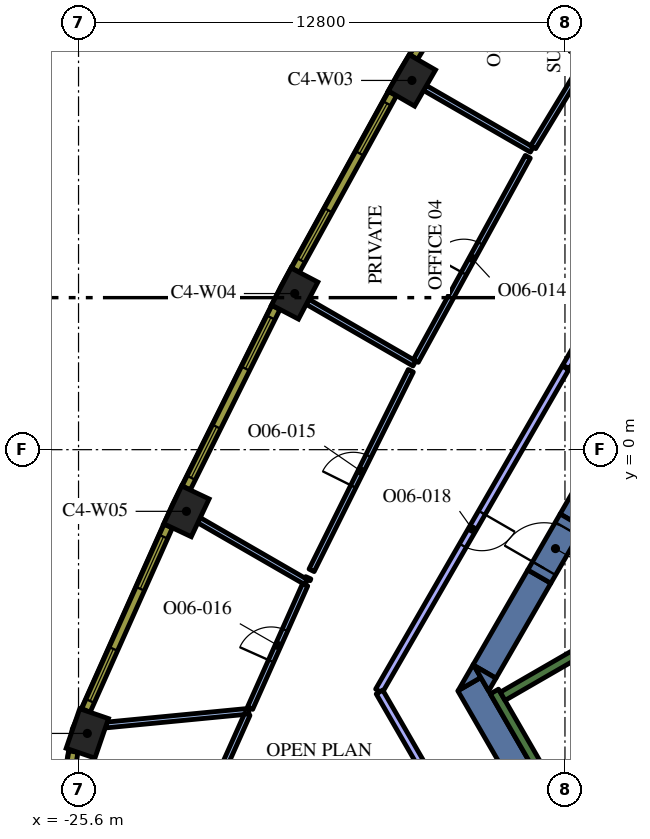
"""IFC4 building model, lengths in metres.
Left out: names, types, materials, properties, quantities, classifications, styles, units other than length and angle.
Written with IfcOpenShell. Run it as: python <this file> out.ifc"""

import sys

from ifc_helpers import new_model, si_unit, direction, frame, frame_2d, origin, origin_2d, place, context, subcontext, project, spatial, polyline, rectangle, outline, extrude, element, fill, save


model = new_model("IFC4")
c1 = context("Model", 3, precision=1e-05, world=origin(), true_north=direction((0.0, 1.0)))
c2 = subcontext(c1, "Body", "Model", "MODEL_VIEW")
j1 = project(units=[si_unit("LENGTHUNIT", "METRE"), si_unit("PLANEANGLEUNIT", "RADIAN")], contexts=[c1])
p1 = place(None, origin())
s1 = spatial("IfcSite", under=j1, at=p1, CompositionType="ELEMENT")
p2 = place(p1, origin())
s2 = spatial("IfcBuilding", under=s1, at=p2, CompositionType="ELEMENT")
p3 = place(p2, frame((0.0, 0.0, 201.6)))
s3 = spatial("IfcBuildingStorey", under=s2, at=p3, CompositionType="ELEMENT", Elevation=201.6)
for number, where, z_axis, x_axis in (
    (1, (-16.827, 9.715, 0.0), (0.0, 0.0, 1.0), (-0.5, -0.866, 0.0)),
    (2, (-19.912, 4.108, 0.0), (0.0, 0.0, 1.0), (-0.464, -0.886, 0.0)),
    (3, (-22.76, -1.623, 0.0), (0.0, 0.0, 1.0), (-0.426, -0.905, 0.0)),
    (4, (-25.369, -7.466, 0.0), (0.0, 0.0, 1.0), (-0.324, -0.946, 0.0)),
):
    element("IfcColumn", number, at=place(p3, frame(where, z_axis=z_axis, x_axis=x_axis)), inside=s3, PredefinedType="COLUMN", context=c2, shape_type="SweptSolid", body=[
        extrude(rectangle(XDim=1.1, YDim=0.8, at=origin_2d()), origin(), (0.0, 0.0, 1.0), 4.2),
    ])
p4 = place(p3, frame((-13.402, -9.487, 0.0), z_axis=(0.0, 0.0, 1.0), x_axis=(-0.500020498207, 0.866013568815, 0.0)))
e5 = element("IfcWall", 5, at=p4, inside=s3, PredefinedType="SOLIDWALL", context=c2, shape_type="SweptSolid", body=[
    extrude(rectangle(XDim=3.829, YDim=0.7, at=frame_2d((1.915, 0.0))), origin(), (0.0, 0.0, 1.0), 4.2),
])
p5 = place(p3, origin())
e6 = element("IfcWall", 6, at=p5, inside=s3, PredefinedType="SOLIDWALL", context=c2, shape_type="SweptSolid", body=[
    extrude(outline(polyline([(-15.014, -5.995), (-15.611, -6.339), (-15.213, -5.65), (-15.014, -5.995)])), origin(), (0.0, 0.0, 1.0), 4.2),
])
p6 = place(p3, frame((-13.475, -3.339, 0.0), z_axis=(0.0, 0.0, 1.0), x_axis=(-0.500008214683, -0.866020660983, 0.0)))
e7 = element("IfcWall", 7, at=p6, inside=s3, PredefinedType="SOLIDWALL", context=c2, shape_type="SweptSolid", body=[
    extrude(rectangle(XDim=2.884, YDim=0.7, at=frame_2d((1.442, 0.0))), origin(), (0.0, 0.0, 1.0), 4.2),
])
e8 = element("IfcWall", 8, at=p5, inside=s3, PredefinedType="SOLIDWALL", context=c2, shape_type="SweptSolid", body=[
    extrude(outline(polyline([(-14.809, -6.35), (-15.197, -5.678), (-14.615, -6.014), (-14.809, -6.35)])), origin(), (0.0, 0.0, 1.0), 4.2),
])
p7 = place(p3, frame((-12.625, -1.867, 0.0), z_axis=(0.0, 0.0, 1.0), x_axis=(0.499998841866, 0.866026072432, 0.0)))
e9 = element("IfcWall", 9, at=p7, inside=s3, PredefinedType="SOLIDWALL", context=c2, shape_type="SweptSolid", body=[
    extrude(rectangle(XDim=16.694, YDim=0.7, at=frame_2d((8.347, 0.0))), origin(), (0.0, 0.0, 1.0), 4.2),
])
p8 = place(p3, frame((-12.84, -9.511, 0.0), z_axis=(0.0, 0.0, 1.0), x_axis=(-0.499997733992, 0.866026712061, 0.0)))
e10 = element("IfcWall", 10, at=p8, inside=s3, PredefinedType="SOLIDWALL", context=c2, shape_type="SweptSolid", body=[
    extrude(rectangle(XDim=3.634, YDim=0.25, at=frame_2d((1.817, 0.0))), origin(), (0.0, 0.0, 1.0), 4.2),
])
p9 = place(p3, frame((-14.44, -6.49, 0.0), z_axis=(0.0, 0.0, 1.0), x_axis=(0.866022966069, 0.500004222222, 0.0)))
e11 = element("IfcWall", 11, at=p9, inside=s3, PredefinedType="SOLIDWALL", context=c2, shape_type="SweptSolid", body=[
    extrude(rectangle(XDim=6.8, YDim=0.25, at=frame_2d((3.4, 0.0))), origin(), (0.0, 0.0, 1.0), 4.2),
])
p10 = place(p3, frame((-12.84, -9.261, 0.0), z_axis=(0.0, 0.0, 1.0), x_axis=(0.866016039709, 0.500016218704, 0.0)))
e12 = element("IfcWall", 12, at=p10, inside=s3, PredefinedType="SOLIDWALL", context=c2, shape_type="SweptSolid", body=[
    extrude(rectangle(XDim=7.05, YDim=0.25, at=frame_2d((3.525, 0.0))), origin(), (0.0, 0.0, 1.0), 4.2),
])
p11 = place(p3, frame((-13.475, -3.339, 0.0), z_axis=(0.0, 0.0, 1.0), x_axis=(0.499954529098, 0.86605165483, 0.0)))
e13 = element("IfcWall", 13, at=p11, inside=s3, PredefinedType="SOLIDWALL", context=c2, shape_type="SweptSolid", body=[
    extrude(rectangle(XDim=1.7, YDim=0.7, at=frame_2d((0.85, 0.0))), origin(), (0.0, 0.0, 1.0), 4.2),
])
p12 = place(p11, frame((0.25, 0.0, 0.0)))
e14 = element("IfcOpeningElement", 14, at=p12, cuts=e13, PredefinedType="OPENING", context=c2, shape_type="SweptSolid", body=[
    extrude(rectangle(XDim=1.2, YDim=2.1, at=frame_2d((0.6, 1.05))), frame((0.0, 0.36, 0.0), z_axis=(0.0, -1.0, 0.0), x_axis=(1.0, 0.0, 0.0)), (0.0, 0.0, 1.0), 0.72),
])
p13 = place(p3, frame((-13.674, 7.895, 0.0), z_axis=(0.0, 0.0, 1.0), x_axis=(-0.866032537582, 0.499987643696, 0.0)))
e15 = element("IfcWall", 15, at=p13, inside=s3, PredefinedType="PARTITIONING", context=c2, shape_type="SweptSolid", body=[
    extrude(rectangle(XDim=3.241, YDim=0.15, at=frame_2d((1.62, 0.0))), origin(), (0.0, 0.0, 1.0), 3.45),
])
p14 = place(p3, frame((-13.635, 7.959, 0.0), z_axis=(0.0, 0.0, 1.0), x_axis=(0.518788941184, 0.854902353784, 0.0)))
e16 = element("IfcWall", 16, at=p14, inside=s3, PredefinedType="PARTITIONING", context=c2, shape_type="SweptSolid", body=[
    extrude(rectangle(XDim=6.129, YDim=0.15, at=frame_2d((3.064, 0.0))), origin(), (0.0, 0.0, 1.0), 3.45),
])
p15 = place(p14, frame((2.629, 0.0, 0.0)))
e17 = element("IfcOpeningElement", 17, at=p15, cuts=e16, PredefinedType="OPENING", context=c2, shape_type="SweptSolid", body=[
    extrude(rectangle(XDim=0.9, YDim=2.1, at=frame_2d((0.45, 1.05))), frame((0.0, 0.085, 0.0), z_axis=(0.0, -1.0, 0.0), x_axis=(1.0, 0.0, 0.0)), (0.0, 0.0, 1.0), 0.17),
])
p16 = place(p3, frame((-16.761, 2.268, 0.0), z_axis=(0.0, 0.0, 1.0), x_axis=(-0.866022812202, 0.500004488726, 0.0)))
e18 = element("IfcWall", 18, at=p16, inside=s3, PredefinedType="PARTITIONING", context=c2, shape_type="SweptSolid", body=[
    extrude(rectangle(XDim=3.247, YDim=0.15, at=frame_2d((1.624, 0.0))), origin(), (0.0, 0.0, 1.0), 3.45),
])
p17 = place(p3, frame((-16.725, 2.333, 0.0), z_axis=(0.0, 0.0, 1.0), x_axis=(0.480955103875, 0.876745224142, 0.0)))
e19 = element("IfcWall", 19, at=p17, inside=s3, PredefinedType="PARTITIONING", context=c2, shape_type="SweptSolid", body=[
    extrude(rectangle(XDim=6.129, YDim=0.15, at=frame_2d((3.064, 0.0))), origin(), (0.0, 0.0, 1.0), 3.45),
])
p18 = place(p17, frame((2.629, 0.0, 0.0)))
e20 = element("IfcOpeningElement", 20, at=p18, cuts=e19, PredefinedType="OPENING", context=c2, shape_type="SweptSolid", body=[
    extrude(rectangle(XDim=0.9, YDim=2.1, at=frame_2d((0.45, 1.05))), frame((0.0, 0.085, 0.0), z_axis=(0.0, -1.0, 0.0), x_axis=(1.0, 0.0, 0.0)), (0.0, 0.0, 1.0), 0.17),
])
p19 = place(p3, frame((-19.606, -3.487, 0.0), z_axis=(0.0, 0.0, 1.0), x_axis=(-0.866017179828, 0.50001424404, 0.0)))
e21 = element("IfcWall", 21, at=p19, inside=s3, PredefinedType="PARTITIONING", context=c2, shape_type="SweptSolid", body=[
    extrude(rectangle(XDim=3.259, YDim=0.15, at=frame_2d((1.63, 0.0))), origin(), (0.0, 0.0, 1.0), 3.45),
])
p20 = place(p3, frame((-19.467, -3.175, 0.0), z_axis=(0.0, 0.0, 1.0), x_axis=(0.445180755526, 0.895440726631, 0.0)))
e22 = element("IfcWall", 22, at=p20, inside=s3, PredefinedType="PARTITIONING", context=c2, shape_type="SweptSolid", body=[
    extrude(rectangle(XDim=5.864, YDim=0.15, at=frame_2d((2.932, 0.0))), origin(), (0.0, 0.0, 1.0), 3.45),
])
p21 = place(p20, frame((2.464, 0.0, 0.0)))
e23 = element("IfcOpeningElement", 23, at=p21, cuts=e22, PredefinedType="OPENING", context=c2, shape_type="SweptSolid", body=[
    extrude(rectangle(XDim=0.9, YDim=2.1, at=frame_2d((0.45, 1.05))), frame((0.0, 0.085, 0.0), z_axis=(0.0, -1.0, 0.0), x_axis=(1.0, 0.0, 0.0)), (0.0, 0.0, 1.0), 0.17),
])
p22 = place(p3, frame((-19.554, -3.371, 0.0), z_axis=(0.0, 0.0, 1.0), x_axis=(-0.408782924594, -0.912631645605, 0.0)))
e24 = element("IfcWall", 24, at=p22, inside=s3, PredefinedType="PARTITIONING", context=c2, shape_type="SweptSolid", body=[
    extrude(rectangle(XDim=0.051, YDim=0.15, at=frame_2d((0.026, 0.0))), origin(), (0.0, 0.0, 1.0), 3.45),
])
p23 = place(p3, frame((-21.122, -6.882, 0.0), z_axis=(0.0, 0.0, 1.0), x_axis=(-0.995354824533, -0.096274468471, 0.0)))
e25 = element("IfcWall", 25, at=p23, inside=s3, PredefinedType="PARTITIONING", context=c2, shape_type="SweptSolid", body=[
    extrude(rectangle(XDim=3.766, YDim=0.15, at=frame_2d((1.883, 0.0))), origin(), (0.0, 0.0, 1.0), 3.45),
])
p24 = place(p3, frame((-21.087, -6.803, 0.0), z_axis=(0.0, 0.0, 1.0), x_axis=(0.40757725445, 0.913170729741, 0.0)))
e26 = element("IfcWall", 26, at=p24, inside=s3, PredefinedType="PARTITIONING", context=c2, shape_type="SweptSolid", body=[
    extrude(rectangle(XDim=3.557, YDim=0.15, at=frame_2d((1.778, 0.0))), origin(), (0.0, 0.0, 1.0), 3.45),
])
p25 = place(p24, frame((1.357, 0.0, 0.0)))
e27 = element("IfcOpeningElement", 27, at=p25, cuts=e26, PredefinedType="OPENING", context=c2, shape_type="SweptSolid", body=[
    extrude(rectangle(XDim=0.9, YDim=2.1, at=frame_2d((0.45, 1.05))), frame((0.0, 0.085, 0.0), z_axis=(0.0, -1.0, 0.0), x_axis=(1.0, 0.0, 0.0)), (0.0, 0.0, 1.0), 0.17),
])
p26 = place(p3, frame((-21.157, -6.961, 0.0), z_axis=(0.0, 0.0, 1.0), x_axis=(-0.407627569492, -0.913148270869, 0.0)))
e28 = element("IfcWall", 28, at=p26, inside=s3, PredefinedType="PARTITIONING", context=c2, shape_type="SweptSolid", body=[
    extrude(rectangle(XDim=1.718, YDim=0.15, at=frame_2d((0.859, 0.0))), origin(), (0.0, 0.0, 1.0), 3.45),
])
p27 = place(p3, frame((-8.272, 9.972, 0.0), z_axis=(0.0, 0.0, 1.0), x_axis=(-0.5000018851, -0.866024315419, 0.0)))
e29 = element("IfcWall", 29, at=p27, inside=s3, PredefinedType="PARTITIONING", context=c2, shape_type="SweptSolid", body=[
    extrude(rectangle(XDim=9.0, YDim=0.2, at=frame_2d((4.5, 0.0))), origin(), (0.0, 0.0, 1.0), 3.45),
])
p28 = place(p3, frame((-12.787, 2.152, 0.0), z_axis=(0.0, 0.0, 1.0), x_axis=(-0.50000660679, -0.866021589319, 0.0)))
e30 = element("IfcWall", 30, at=p28, inside=s3, PredefinedType="PARTITIONING", context=c2, shape_type="SweptSolid", body=[
    extrude(rectangle(XDim=9.817, YDim=0.2, at=frame_2d((4.909, 0.0))), origin(), (0.0, 0.0, 1.0), 3.45),
])
p29 = place(p28, frame((4.4, 0.0, 0.0)))
e31 = element("IfcOpeningElement", 31, at=p29, cuts=e30, PredefinedType="OPENING", context=c2, shape_type="SweptSolid", body=[
    extrude(rectangle(XDim=1.0, YDim=2.1, at=frame_2d((0.5, 1.05))), frame((0.0, 0.11, 0.0), z_axis=(0.0, -1.0, 0.0), x_axis=(1.0, 0.0, 0.0)), (0.0, 0.0, 1.0), 0.22),
])
p30 = place(p3, frame((-17.681, -6.376, 0.0), z_axis=(0.0, 0.0, 1.0), x_axis=(0.500022299258, -0.866012528919, 0.0)))
e32 = element("IfcWall", 32, at=p30, inside=s3, PredefinedType="PARTITIONING", context=c2, shape_type="SweptSolid", body=[
    extrude(rectangle(XDim=3.219, YDim=0.2, at=frame_2d((1.609, 0.0))), origin(), (0.0, 0.0, 1.0), 3.45),
])
p31 = place(p3, frame((-14.038, 14.864, 0.0), z_axis=(0.0, 0.0, 1.0), x_axis=(-0.517846166225, -0.855473756538, 0.0)))
e33 = element("IfcWall", 33, at=p31, inside=s3, PredefinedType="SOLIDWALL", context=c2, shape_type="SweptSolid", body=[
    extrude(rectangle(XDim=5.298, YDim=0.24, at=frame_2d((2.649, 0.0))), origin(), (0.0, 0.0, 1.0), 3.95),
])
p32 = place(p31, frame((0.294, 0.0, 0.9)))
e34 = element("IfcOpeningElement", 34, at=p32, cuts=e33, PredefinedType="OPENING", context=c2, shape_type="SweptSolid", body=[
    extrude(rectangle(XDim=1.5, YDim=2.55, at=frame_2d((0.75, 1.275))), frame((0.0, 0.13, 0.0), z_axis=(0.0, -1.0, 0.0), x_axis=(1.0, 0.0, 0.0)), (0.0, 0.0, 1.0), 0.26),
])
p33 = place(p31, frame((3.504, 0.0, 0.9)))
e35 = element("IfcOpeningElement", 35, at=p33, cuts=e33, PredefinedType="OPENING", context=c2, shape_type="SweptSolid", body=[
    extrude(rectangle(XDim=1.5, YDim=2.55, at=frame_2d((0.75, 1.275))), frame((0.0, 0.13, 0.0), z_axis=(0.0, -1.0, 0.0), x_axis=(1.0, 0.0, 0.0)), (0.0, 0.0, 1.0), 0.26),
])
p34 = place(p3, frame((-17.338, 9.368, 0.0), z_axis=(0.0, 0.0, 1.0), x_axis=(-0.481925825015, -0.876212017256, 0.0)))
e36 = element("IfcWall", 36, at=p34, inside=s3, PredefinedType="SOLIDWALL", context=c2, shape_type="SweptSolid", body=[
    extrude(rectangle(XDim=5.299, YDim=0.24, at=frame_2d((2.649, 0.0))), origin(), (0.0, 0.0, 1.0), 3.95),
])
p35 = place(p34, frame((0.295, 0.0, 0.9)))
e37 = element("IfcOpeningElement", 37, at=p35, cuts=e36, PredefinedType="OPENING", context=c2, shape_type="SweptSolid", body=[
    extrude(rectangle(XDim=1.5, YDim=2.55, at=frame_2d((0.75, 1.275))), frame((0.0, 0.13, 0.0), z_axis=(0.0, -1.0, 0.0), x_axis=(1.0, 0.0, 0.0)), (0.0, 0.0, 1.0), 0.26),
])
p36 = place(p34, frame((3.504, 0.0, 0.9)))
e38 = element("IfcOpeningElement", 38, at=p36, cuts=e36, PredefinedType="OPENING", context=c2, shape_type="SweptSolid", body=[
    extrude(rectangle(XDim=1.5, YDim=2.55, at=frame_2d((0.75, 1.275))), frame((0.0, 0.13, 0.0), z_axis=(0.0, -1.0, 0.0), x_axis=(1.0, 0.0, 0.0)), (0.0, 0.0, 1.0), 0.26),
])
p37 = place(p3, frame((-20.407, 3.74, 0.0), z_axis=(0.0, 0.0, 1.0), x_axis=(-0.445129582031, -0.895466166419, 0.0)))
e39 = element("IfcWall", 39, at=p37, inside=s3, PredefinedType="SOLIDWALL", context=c2, shape_type="SweptSolid", body=[
    extrude(rectangle(XDim=5.298, YDim=0.24, at=frame_2d((2.649, 0.0))), origin(), (0.0, 0.0, 1.0), 3.95),
])
p38 = place(p37, frame((0.295, 0.0, 0.9)))
e40 = element("IfcOpeningElement", 40, at=p38, cuts=e39, PredefinedType="OPENING", context=c2, shape_type="SweptSolid", body=[
    extrude(rectangle(XDim=1.5, YDim=2.55, at=frame_2d((0.75, 1.275))), frame((0.0, 0.13, 0.0), z_axis=(0.0, -1.0, 0.0), x_axis=(1.0, 0.0, 0.0)), (0.0, 0.0, 1.0), 0.26),
])
p39 = place(p37, frame((3.504, 0.0, 0.9)))
e41 = element("IfcOpeningElement", 41, at=p39, cuts=e39, PredefinedType="OPENING", context=c2, shape_type="SweptSolid", body=[
    extrude(rectangle(XDim=1.5, YDim=2.55, at=frame_2d((0.75, 1.275))), frame((0.0, 0.13, 0.0), z_axis=(0.0, -1.0, 0.0), x_axis=(1.0, 0.0, 0.0)), (0.0, 0.0, 1.0), 0.26),
])
p40 = place(p3, frame((-23.24, -2.011, 0.0), z_axis=(0.0, 0.0, 1.0), x_axis=(-0.407579651789, -0.913169659728, 0.0)))
e42 = element("IfcWall", 42, at=p40, inside=s3, PredefinedType="SOLIDWALL", context=c2, shape_type="SweptSolid", body=[
    extrude(rectangle(XDim=5.311, YDim=0.24, at=frame_2d((2.655, 0.0))), origin(), (0.0, 0.0, 1.0), 3.95),
])
p41 = place(p40, frame((0.306, 0.0, 0.9)))
e43 = element("IfcOpeningElement", 43, at=p41, cuts=e42, PredefinedType="OPENING", context=c2, shape_type="SweptSolid", body=[
    extrude(rectangle(XDim=1.5, YDim=2.55, at=frame_2d((0.75, 1.275))), frame((0.0, 0.13, 0.0), z_axis=(0.0, -1.0, 0.0), x_axis=(1.0, 0.0, 0.0)), (0.0, 0.0, 1.0), 0.26),
])
p42 = place(p40, frame((3.539, 0.0, 0.9)))
e44 = element("IfcOpeningElement", 44, at=p42, cuts=e42, PredefinedType="OPENING", context=c2, shape_type="SweptSolid", body=[
    extrude(rectangle(XDim=1.5, YDim=2.55, at=frame_2d((0.75, 1.275))), frame((0.0, 0.13, 0.0), z_axis=(0.0, -1.0, 0.0), x_axis=(1.0, 0.0, 0.0)), (0.0, 0.0, 1.0), 0.26),
])
p43 = place(p3, frame((-25.734, -7.945, 0.0), z_axis=(0.0, 0.0, 1.0), x_axis=(-0.167660055546, -0.985844869021, 0.0)))
e45 = element("IfcWall", 45, at=p43, inside=s3, PredefinedType="SOLIDWALL", context=c2, shape_type="SweptSolid", body=[
    extrude(rectangle(XDim=2.609, YDim=0.24, at=frame_2d((1.305, 0.0))), origin(), (0.0, 0.0, 1.0), 3.95),
])
p44 = place(p43, frame((0.805, 0.0, 0.9)))
e46 = element("IfcOpeningElement", 46, at=p44, cuts=e45, PredefinedType="OPENING", context=c2, shape_type="SweptSolid", body=[
    extrude(rectangle(XDim=1.0, YDim=2.55, at=frame_2d((0.5, 1.275))), frame((0.0, 0.13, 0.0), z_axis=(0.0, -1.0, 0.0), x_axis=(1.0, 0.0, 0.0)), (0.0, 0.0, 1.0), 0.26),
])
p45 = place(p12, origin())
e47 = element("IfcDoor", 47, at=p45, inside=s3, OperationType="SINGLE_SWING_LEFT", PredefinedType="DOOR", context=c2, shape_type="SweptSolid", body=[
    extrude(rectangle(XDim=1.2, YDim=2.1, at=frame_2d((0.6, 1.05))), frame((0.0, 0.025, 0.0), z_axis=(0.0, -1.0, 0.0), x_axis=(1.0, 0.0, 0.0)), (0.0, 0.0, 1.0), 0.05),
])
fill(e14, e47)
p46 = place(p18, origin())
e48 = element("IfcDoor", 48, at=p46, inside=s3, OperationType="SINGLE_SWING_RIGHT", PredefinedType="DOOR", context=c2, shape_type="SweptSolid", body=[
    extrude(rectangle(XDim=0.9, YDim=2.1, at=frame_2d((0.45, 1.05))), frame((0.0, 0.025, 0.0), z_axis=(0.0, -1.0, 0.0), x_axis=(1.0, 0.0, 0.0)), (0.0, 0.0, 1.0), 0.05),
])
fill(e20, e48)
p47 = place(p21, origin())
e49 = element("IfcDoor", 49, at=p47, inside=s3, OperationType="SINGLE_SWING_LEFT", PredefinedType="DOOR", context=c2, shape_type="SweptSolid", body=[
    extrude(rectangle(XDim=0.9, YDim=2.1, at=frame_2d((0.45, 1.05))), frame((0.0, 0.025, 0.0), z_axis=(0.0, -1.0, 0.0), x_axis=(1.0, 0.0, 0.0)), (0.0, 0.0, 1.0), 0.05),
])
fill(e23, e49)
p48 = place(p25, origin())
e50 = element("IfcDoor", 50, at=p48, inside=s3, OperationType="SINGLE_SWING_RIGHT", PredefinedType="DOOR", context=c2, shape_type="SweptSolid", body=[
    extrude(rectangle(XDim=0.9, YDim=2.1, at=frame_2d((0.45, 1.05))), frame((0.0, 0.025, 0.0), z_axis=(0.0, -1.0, 0.0), x_axis=(1.0, 0.0, 0.0)), (0.0, 0.0, 1.0), 0.05),
])
fill(e27, e50)
p49 = place(p29, origin())
e51 = element("IfcDoor", 51, at=p49, inside=s3, OperationType="SINGLE_SWING_LEFT", PredefinedType="DOOR", context=c2, shape_type="SweptSolid", body=[
    extrude(rectangle(XDim=1.0, YDim=2.1, at=frame_2d((0.5, 1.05))), frame((0.0, 0.025, 0.0), z_axis=(0.0, -1.0, 0.0), x_axis=(1.0, 0.0, 0.0)), (0.0, 0.0, 1.0), 0.05),
])
fill(e31, e51)
p50 = place(p35, origin())
e52 = element("IfcWindow", 52, at=p50, inside=s3, PartitioningType="SINGLE_PANEL", PredefinedType="WINDOW", context=c2, shape_type="SweptSolid", body=[
    extrude(rectangle(XDim=1.5, YDim=2.55, at=frame_2d((0.75, 1.275))), frame((0.0, 0.04, 0.0), z_axis=(0.0, -1.0, 0.0), x_axis=(1.0, 0.0, 0.0)), (0.0, 0.0, 1.0), 0.06),
])
fill(e37, e52)
p51 = place(p36, origin())
e53 = element("IfcWindow", 53, at=p51, inside=s3, PartitioningType="SINGLE_PANEL", PredefinedType="WINDOW", context=c2, shape_type="SweptSolid", body=[
    extrude(rectangle(XDim=1.5, YDim=2.55, at=frame_2d((0.75, 1.275))), frame((0.0, 0.04, 0.0), z_axis=(0.0, -1.0, 0.0), x_axis=(1.0, 0.0, 0.0)), (0.0, 0.0, 1.0), 0.06),
])
fill(e38, e53)
p52 = place(p38, origin())
e54 = element("IfcWindow", 54, at=p52, inside=s3, PartitioningType="SINGLE_PANEL", PredefinedType="WINDOW", context=c2, shape_type="SweptSolid", body=[
    extrude(rectangle(XDim=1.5, YDim=2.55, at=frame_2d((0.75, 1.275))), frame((0.0, 0.04, 0.0), z_axis=(0.0, -1.0, 0.0), x_axis=(1.0, 0.0, 0.0)), (0.0, 0.0, 1.0), 0.06),
])
fill(e40, e54)
p53 = place(p39, origin())
e55 = element("IfcWindow", 55, at=p53, inside=s3, PartitioningType="SINGLE_PANEL", PredefinedType="WINDOW", context=c2, shape_type="SweptSolid", body=[
    extrude(rectangle(XDim=1.5, YDim=2.55, at=frame_2d((0.75, 1.275))), frame((0.0, 0.04, 0.0), z_axis=(0.0, -1.0, 0.0), x_axis=(1.0, 0.0, 0.0)), (0.0, 0.0, 1.0), 0.06),
])
fill(e41, e55)
p54 = place(p41, origin())
e56 = element("IfcWindow", 56, at=p54, inside=s3, PartitioningType="SINGLE_PANEL", PredefinedType="WINDOW", context=c2, shape_type="SweptSolid", body=[
    extrude(rectangle(XDim=1.5, YDim=2.55, at=frame_2d((0.75, 1.275))), frame((0.0, 0.04, 0.0), z_axis=(0.0, -1.0, 0.0), x_axis=(1.0, 0.0, 0.0)), (0.0, 0.0, 1.0), 0.06),
])
fill(e43, e56)
p55 = place(p42, origin())
e57 = element("IfcWindow", 57, at=p55, inside=s3, PartitioningType="SINGLE_PANEL", PredefinedType="WINDOW", context=c2, shape_type="SweptSolid", body=[
    extrude(rectangle(XDim=1.5, YDim=2.55, at=frame_2d((0.75, 1.275))), frame((0.0, 0.04, 0.0), z_axis=(0.0, -1.0, 0.0), x_axis=(1.0, 0.0, 0.0)), (0.0, 0.0, 1.0), 0.06),
])
fill(e44, e57)
save(model, sys.argv[1])
